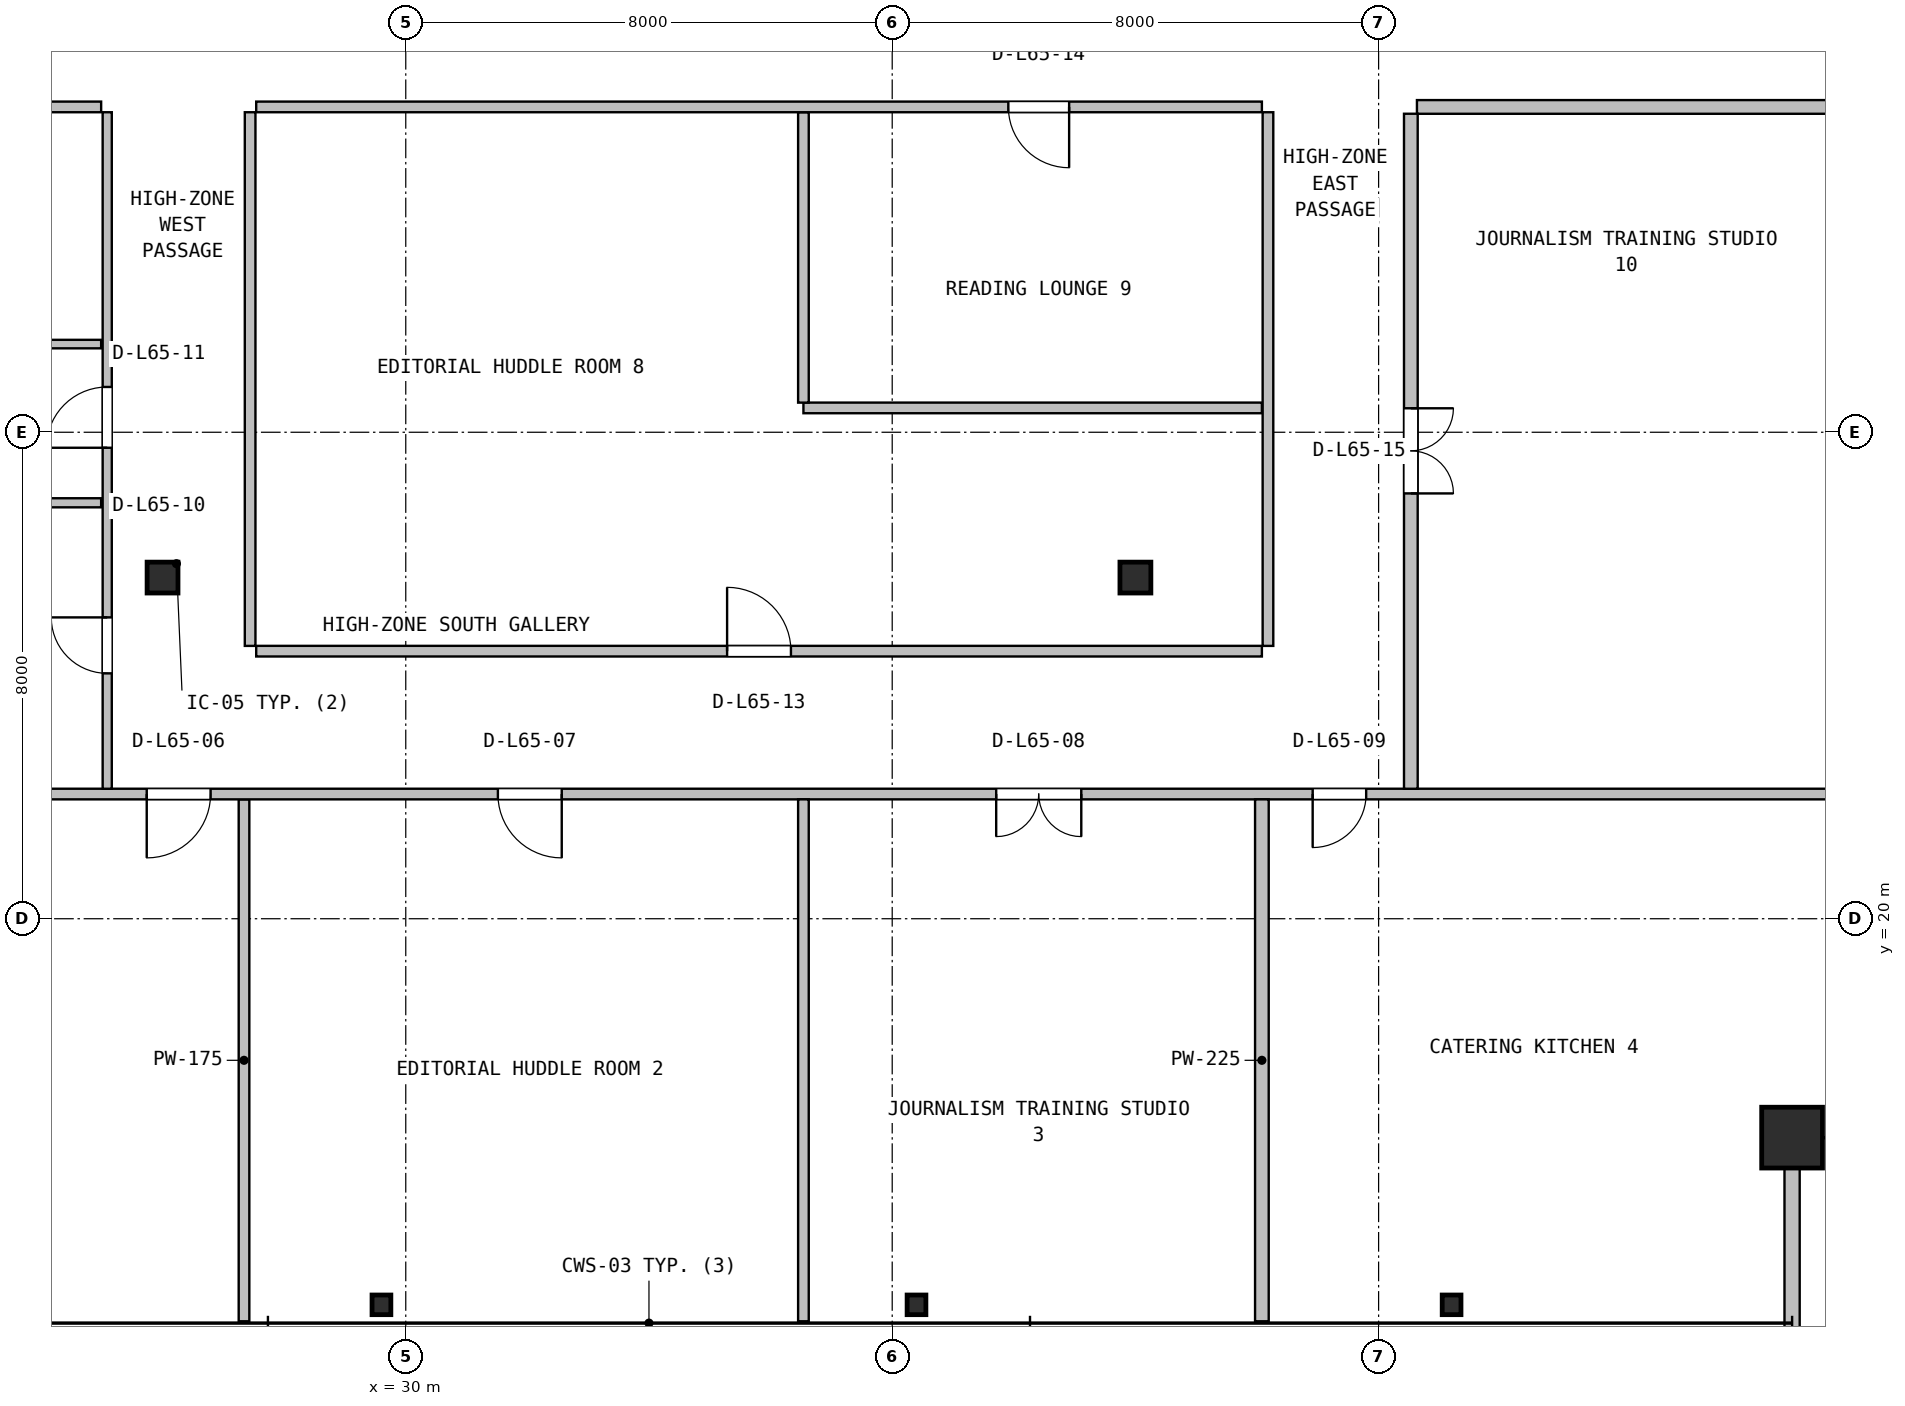
"""IFC4 building model, lengths in metres.
Left out: names, types, materials, properties, quantities, classifications, styles, units other than length and angle.
Written with IfcOpenShell. Run it as: python <this file> out.ifc"""

import sys

from ifc_helpers import new_model, si_unit, direction, frame, frame_2d, origin, origin_2d, place, context, subcontext, project, spatial, rectangle, hollow_rectangle, hollow_circle, i_section, extrude, source, transform, mapped, element, fill, save


model = new_model("IFC4")
c1 = context("Model", 3, precision=1e-05, world=origin(), true_north=direction((0.0, 1.0)))
c2 = subcontext(c1, "Body", "Model", "MODEL_VIEW")
j1 = project(units=[si_unit("LENGTHUNIT", "METRE"), si_unit("PLANEANGLEUNIT", "RADIAN")], contexts=[c1])
p1 = place(None, origin())
s1 = spatial("IfcSite", under=j1, at=p1, CompositionType="ELEMENT")
p2 = place(p1, origin())
s2 = spatial("IfcBuilding", under=s1, at=p2, CompositionType="ELEMENT")
p3 = place(p2, frame((0.0, 0.0, 262.2)))
s3 = spatial("IfcBuildingStorey", under=s2, at=p3, CompositionType="ELEMENT", Elevation=262.2)
m1 = source(origin(), c2, "Body", "SweptSolid", [
    extrude(hollow_rectangle(XDim=1.0, YDim=1.0, WallThickness=0.04, at=origin_2d()), origin(), (0.0, 0.0, 1.0), 3.8),
])
p4 = place(p3, frame((52.8, 16.4, 0.0), z_axis=(0.0, 0.0, 1.0), x_axis=(1.0, 0.0, 0.0)))
e1 = element("IfcColumn", 1, at=p4, inside=s3, PredefinedType="COLUMN", context=c2, shape_type="MappedRepresentation", body=[
    mapped(m1, transform((0.0, 0.0, 0.0), x_axis=(1.0, 0.0, 0.0), y_axis=(0.0, 1.0, 0.0), z_axis=(0.0, 0.0, 1.0), scale=1.0)),
])
m2 = source(origin(), c2, "Body", "SweptSolid", [
    extrude(i_section(OverallWidth=0.309, OverallDepth=0.323, WebThickness=0.014, FlangeThickness=0.023, FilletRadius=0.015, at=origin_2d()), origin(), (0.0, 0.0, 1.0), 3.8),
])
for number, where, z_axis, x_axis in (
    (2, (29.6, 13.65, 0.0), (0.0, 0.0, 1.0), (1.0, 0.0, 0.0)),
    (3, (38.4, 13.65, 0.0), (0.0, 0.0, 1.0), (1.0, 0.0, 0.0)),
    (4, (47.2, 13.65, 0.0), (0.0, 0.0, 1.0), (1.0, 0.0, 0.0)),
):
    element("IfcColumn", number, at=place(p3, frame(where, z_axis=z_axis, x_axis=x_axis)), inside=s3, PredefinedType="COLUMN", context=c2, shape_type="MappedRepresentation", body=[
        mapped(m2, transform((0.0, 0.0, 0.0), x_axis=(1.0, 0.0, 0.0), y_axis=(0.0, 1.0, 0.0), z_axis=(0.0, 0.0, 1.0), scale=1.0)),
    ])
m3 = source(origin(), c2, "Body", "SweptSolid", [
    extrude(hollow_circle(Radius=0.254, WallThickness=0.02, at=origin_2d()), origin(), (0.0, 0.0, 1.0), 3.8),
])
for number, where, z_axis, x_axis in (
    (5, (26.0, 25.61, 0.0), (0.0, 0.0, 1.0), (1.0, 0.0, 0.0)),
    (6, (42.0, 25.61, 0.0), (0.0, 0.0, 1.0), (1.0, 0.0, 0.0)),
):
    element("IfcColumn", number, at=place(p3, frame(where, z_axis=z_axis, x_axis=x_axis)), inside=s3, PredefinedType="COLUMN", context=c2, shape_type="MappedRepresentation", body=[
        mapped(m3, transform((0.0, 0.0, 0.0), x_axis=(1.0, 0.0, 0.0), y_axis=(0.0, 1.0, 0.0), z_axis=(0.0, 0.0, 1.0), scale=1.0)),
    ])
p5 = place(p3, frame((52.8, 13.28, 0.0), z_axis=(0.0, 0.0, 1.0), x_axis=(0.0, 1.0, 0.0)))
e7 = element("IfcWall", 7, at=p5, inside=s3, PredefinedType="SOLIDWALL", context=c2, shape_type="SweptSolid", body=[
    extrude(rectangle(XDim=3.2, YDim=0.25, at=frame_2d((1.6, 0.0))), origin(), (0.0, 0.0, 1.0), 3.171),
])
p6 = place(p3, frame((27.34, 13.38, 0.0), z_axis=(0.0, 0.0, 1.0), x_axis=(0.0, 1.0, 0.0)))
e8 = element("IfcWall", 8, at=p6, inside=s3, PredefinedType="PARTITIONING", context=c2, shape_type="SweptSolid", body=[
    extrude(rectangle(XDim=8.583, YDim=0.175, at=frame_2d((4.292, 0.0))), origin(), (0.0, 0.0, 1.0), 2.981),
])
p7 = place(p3, frame((12.18, 22.05, 0.0), z_axis=(0.0, 0.0, 1.0), x_axis=(1.0, 0.0, 0.0)))
e9 = element("IfcWall", 9, at=p7, inside=s3, PredefinedType="PARTITIONING", context=c2, shape_type="SweptSolid", body=[
    extrude(rectangle(XDim=43.64, YDim=0.175, at=frame_2d((21.82, 0.0))), origin(), (0.0, 0.0, 1.0), 2.981),
])
p8 = place(p7, frame((13.56, 0.0, 0.0)))
e10 = element("IfcOpeningElement", 10, at=p8, cuts=e9, PredefinedType="OPENING", context=c2, shape_type="SweptSolid", body=[
    extrude(rectangle(XDim=1.05, YDim=2.1, at=frame_2d((0.525, 1.05))), frame((0.0, 0.098, 0.0), z_axis=(0.0, -1.0, 0.0), x_axis=(1.0, 0.0, 0.0)), (0.0, 0.0, 1.0), 0.195),
])
p9 = place(p7, frame((19.335, 0.0, 0.0)))
e11 = element("IfcOpeningElement", 11, at=p9, cuts=e9, PredefinedType="OPENING", context=c2, shape_type="SweptSolid", body=[
    extrude(rectangle(XDim=1.05, YDim=2.1, at=frame_2d((0.525, 1.05))), frame((0.0, 0.098, 0.0), z_axis=(0.0, -1.0, 0.0), x_axis=(1.0, 0.0, 0.0)), (0.0, 0.0, 1.0), 0.195),
])
p10 = place(p7, frame((27.53, 0.0, 0.0)))
e12 = element("IfcOpeningElement", 12, at=p10, cuts=e9, PredefinedType="OPENING", context=c2, shape_type="SweptSolid", body=[
    extrude(rectangle(XDim=1.4, YDim=2.12, at=frame_2d((0.7, 1.06))), frame((0.0, 0.098, 0.0), z_axis=(0.0, -1.0, 0.0), x_axis=(1.0, 0.0, 0.0)), (0.0, 0.0, 1.0), 0.195),
])
p11 = place(p7, frame((32.735, 0.0, 0.0)))
e13 = element("IfcOpeningElement", 13, at=p11, cuts=e9, PredefinedType="OPENING", context=c2, shape_type="SweptSolid", body=[
    extrude(rectangle(XDim=0.88, YDim=2.06, at=frame_2d((0.44, 1.03))), frame((0.0, 0.098, 0.0), z_axis=(0.0, -1.0, 0.0), x_axis=(1.0, 0.0, 0.0)), (0.0, 0.0, 1.0), 0.195),
])
p12 = place(p3, frame((36.54, 13.38, 0.0), z_axis=(0.0, 0.0, 1.0), x_axis=(0.0, 1.0, 0.0)))
e14 = element("IfcWall", 14, at=p12, inside=s3, PredefinedType="PARTITIONING", context=c2, shape_type="SweptSolid", body=[
    extrude(rectangle(XDim=8.583, YDim=0.175, at=frame_2d((4.292, 0.0))), origin(), (0.0, 0.0, 1.0), 3.171),
])
p13 = place(p3, frame((44.08, 13.38, 0.0), z_axis=(0.0, 0.0, 1.0), x_axis=(0.0, 1.0, 0.0)))
e15 = element("IfcWall", 15, at=p13, inside=s3, PredefinedType="PARTITIONING", context=c2, shape_type="SweptSolid", body=[
    extrude(rectangle(XDim=8.583, YDim=0.225, at=frame_2d((4.292, 0.0))), origin(), (0.0, 0.0, 1.0), 3.171),
])
p14 = place(p3, frame((25.09, 22.137, 0.0), z_axis=(0.0, 0.0, 1.0), x_axis=(0.0, 1.0, 0.0)))
e16 = element("IfcWall", 16, at=p14, inside=s3, PredefinedType="PARTITIONING", context=c2, shape_type="SweptSolid", body=[
    extrude(rectangle(XDim=11.126, YDim=0.15, at=frame_2d((5.563, 0.0))), origin(), (0.0, 0.0, 1.0), 2.981),
])
p15 = place(p14, frame((1.898, 0.0, 0.0)))
e17 = element("IfcOpeningElement", 17, at=p15, cuts=e16, PredefinedType="OPENING", context=c2, shape_type="SweptSolid", body=[
    extrude(rectangle(XDim=0.92, YDim=2.08, at=frame_2d((0.46, 1.04))), frame((0.0, 0.085, 0.0), z_axis=(0.0, -1.0, 0.0), x_axis=(1.0, 0.0, 0.0)), (0.0, 0.0, 1.0), 0.17),
])
p16 = place(p14, frame((5.608, 0.0, 0.0)))
e18 = element("IfcOpeningElement", 18, at=p16, cuts=e16, PredefinedType="OPENING", context=c2, shape_type="SweptSolid", body=[
    extrude(rectangle(XDim=1.0, YDim=2.1, at=frame_2d((0.5, 1.05))), frame((0.0, 0.085, 0.0), z_axis=(0.0, -1.0, 0.0), x_axis=(1.0, 0.0, 0.0)), (0.0, 0.0, 1.0), 0.17),
])
p17 = place(p3, frame((12.18, 26.84, 0.0), z_axis=(0.0, 0.0, 1.0), x_axis=(1.0, 0.0, 0.0)))
e19 = element("IfcWall", 19, at=p17, inside=s3, PredefinedType="PARTITIONING", context=c2, shape_type="SweptSolid", body=[
    extrude(rectangle(XDim=12.81, YDim=0.15, at=frame_2d((6.405, 0.0))), origin(), (0.0, 0.0, 1.0), 3.171),
])
p18 = place(p3, frame((12.18, 29.45, 0.0), z_axis=(0.0, 0.0, 1.0), x_axis=(1.0, 0.0, 0.0)))
e20 = element("IfcWall", 20, at=p18, inside=s3, PredefinedType="PARTITIONING", context=c2, shape_type="SweptSolid", body=[
    extrude(rectangle(XDim=12.81, YDim=0.14, at=frame_2d((6.405, 0.0))), origin(), (0.0, 0.0, 1.0), 3.171),
])
p19 = place(p3, frame((12.18, 33.35, 0.0), z_axis=(0.0, 0.0, 1.0), x_axis=(1.0, 0.0, 0.0)))
e21 = element("IfcWall", 21, at=p19, inside=s3, PredefinedType="PARTITIONING", context=c2, shape_type="SweptSolid", body=[
    extrude(rectangle(XDim=12.81, YDim=0.175, at=frame_2d((6.405, 0.0))), origin(), (0.0, 0.0, 1.0), 2.981),
])
p20 = place(p19, frame((7.615, 0.0, 0.0)))
e22 = element("IfcOpeningElement", 22, at=p20, cuts=e21, PredefinedType="OPENING", context=c2, shape_type="SweptSolid", body=[
    extrude(rectangle(XDim=1.05, YDim=2.1, at=frame_2d((0.525, 1.05))), frame((0.0, 0.098, 0.0), z_axis=(0.0, -1.0, 0.0), x_axis=(1.0, 0.0, 0.0)), (0.0, 0.0, 1.0), 0.195),
])
p21 = place(p3, frame((27.54, 24.4, 0.0), z_axis=(0.0, 0.0, 1.0), x_axis=(1.0, 0.0, 0.0)))
e23 = element("IfcWall", 23, at=p21, inside=s3, PredefinedType="PARTITIONING", context=c2, shape_type="SweptSolid", body=[
    extrude(rectangle(XDim=16.54, YDim=0.175, at=frame_2d((8.27, 0.0))), origin(), (0.0, 0.0, 1.0), 2.981),
])
p22 = place(p21, frame((7.745, 0.0, 0.0)))
e24 = element("IfcOpeningElement", 24, at=p22, cuts=e23, PredefinedType="OPENING", context=c2, shape_type="SweptSolid", body=[
    extrude(rectangle(XDim=1.05, YDim=2.1, at=frame_2d((0.525, 1.05))), frame((0.0, 0.098, 0.0), z_axis=(0.0, -1.0, 0.0), x_axis=(1.0, 0.0, 0.0)), (0.0, 0.0, 1.0), 0.195),
])
p23 = place(p3, frame((44.18, 24.487, 0.0), z_axis=(0.0, 0.0, 1.0), x_axis=(0.0, 1.0, 0.0)))
e25 = element("IfcWall", 25, at=p23, inside=s3, PredefinedType="PARTITIONING", context=c2, shape_type="SweptSolid", body=[
    extrude(rectangle(XDim=8.776, YDim=0.175, at=frame_2d((4.388, 0.0))), origin(), (0.0, 0.0, 1.0), 3.278),
])
p24 = place(p3, frame((36.54, 28.4, 0.0), z_axis=(0.0, 0.0, 1.0), x_axis=(1.0, 0.0, 0.0)))
e26 = element("IfcWall", 26, at=p24, inside=s3, PredefinedType="PARTITIONING", context=c2, shape_type="SweptSolid", body=[
    extrude(rectangle(XDim=7.54, YDim=0.175, at=frame_2d((3.77, 0.0))), origin(), (0.0, 0.0, 1.0), 2.981),
])
p25 = place(p3, frame((36.54, 28.487, 0.0), z_axis=(0.0, 0.0, 1.0), x_axis=(0.0, 1.0, 0.0)))
e27 = element("IfcWall", 27, at=p25, inside=s3, PredefinedType="PARTITIONING", context=c2, shape_type="SweptSolid", body=[
    extrude(rectangle(XDim=4.776, YDim=0.175, at=frame_2d((2.388, 0.0))), origin(), (0.0, 0.0, 1.0), 3.53),
])
p26 = place(p3, frame((27.54, 33.35, 0.0), z_axis=(0.0, 0.0, 1.0), x_axis=(1.0, 0.0, 0.0)))
e28 = element("IfcWall", 28, at=p26, inside=s3, PredefinedType="PARTITIONING", context=c2, shape_type="SweptSolid", body=[
    extrude(rectangle(XDim=16.54, YDim=0.175, at=frame_2d((8.27, 0.0))), origin(), (0.0, 0.0, 1.0), 2.981),
])
p27 = place(p26, frame((12.37, 0.0, 0.0)))
e29 = element("IfcOpeningElement", 29, at=p27, cuts=e28, PredefinedType="OPENING", context=c2, shape_type="SweptSolid", body=[
    extrude(rectangle(XDim=1.0, YDim=2.1, at=frame_2d((0.5, 1.05))), frame((0.0, 0.098, 0.0), z_axis=(0.0, -1.0, 0.0), x_axis=(1.0, 0.0, 0.0)), (0.0, 0.0, 1.0), 0.195),
])
p28 = place(p3, frame((27.44, 24.487, 0.0), z_axis=(0.0, 0.0, 1.0), x_axis=(0.0, 1.0, 0.0)))
e30 = element("IfcWall", 30, at=p28, inside=s3, PredefinedType="PARTITIONING", context=c2, shape_type="SweptSolid", body=[
    extrude(rectangle(XDim=8.776, YDim=0.175, at=frame_2d((4.388, 0.0))), origin(), (0.0, 0.0, 1.0), 2.981),
])
p29 = place(p3, frame((46.63, 33.35, 0.0), z_axis=(0.0, 0.0, 1.0), x_axis=(1.0, 0.0, 0.0)))
e31 = element("IfcWall", 31, at=p29, inside=s3, PredefinedType="PARTITIONING", context=c2, shape_type="SweptSolid", body=[
    extrude(rectangle(XDim=9.19, YDim=0.225, at=frame_2d((4.595, 0.0))), origin(), (0.0, 0.0, 1.0), 3.171),
])
p30 = place(p3, frame((46.53, 22.137, 0.0), z_axis=(0.0, 0.0, 1.0), x_axis=(0.0, 1.0, 0.0)))
e32 = element("IfcWall", 32, at=p30, inside=s3, PredefinedType="PARTITIONING", context=c2, shape_type="SweptSolid", body=[
    extrude(rectangle(XDim=11.101, YDim=0.225, at=frame_2d((5.551, 0.0))), origin(), (0.0, 0.0, 1.0), 3.222),
])
p31 = place(p30, frame((4.857, 0.0, 0.0)))
e33 = element("IfcOpeningElement", 33, at=p31, cuts=e32, PredefinedType="OPENING", context=c2, shape_type="SweptSolid", body=[
    extrude(rectangle(XDim=1.4, YDim=2.12, at=frame_2d((0.7, 1.06))), frame((0.0, 0.123, 0.0), z_axis=(0.0, -1.0, 0.0), x_axis=(1.0, 0.0, 0.0)), (0.0, 0.0, 1.0), 0.245),
])
m4 = source(origin(), c2, "Body", "SweptSolid", [
    extrude(rectangle(XDim=1.05, YDim=2.1, at=frame_2d((0.525, 1.05))), frame((0.0, 0.025, 0.0), z_axis=(0.0, -1.0, 0.0), x_axis=(1.0, 0.0, 0.0)), (0.0, 0.0, 1.0), 0.05),
])
p32 = place(p8, frame((1.05, 0.0, 0.0), z_axis=(0.0, 0.0, 1.0), x_axis=(-1.0, 0.0, 0.0)))
e34 = element("IfcDoor", 34, at=p32, inside=s3, OperationType="SINGLE_SWING_LEFT", PredefinedType="DOOR", context=c2, shape_type="MappedRepresentation", body=[
    mapped(m4, transform((0.0, 0.0, 0.0), x_axis=(1.0, 0.0, 0.0), y_axis=(0.0, 1.0, 0.0), z_axis=(0.0, 0.0, 1.0), scale=1.0)),
])
fill(e10, e34)
p33 = place(p9, frame((1.05, 0.0, 0.0), z_axis=(0.0, 0.0, 1.0), x_axis=(-1.0, 0.0, 0.0)))
e35 = element("IfcDoor", 35, at=p33, inside=s3, OperationType="SINGLE_SWING_RIGHT", PredefinedType="DOOR", context=c2, shape_type="MappedRepresentation", body=[
    mapped(m4, transform((0.0, 0.0, 0.0), x_axis=(1.0, 0.0, 0.0), y_axis=(0.0, 1.0, 0.0), z_axis=(0.0, 0.0, 1.0), scale=1.0)),
])
fill(e11, e35)
m5 = source(origin(), c2, "Body", "SweptSolid", [
    extrude(rectangle(XDim=1.4, YDim=2.12, at=frame_2d((0.7, 1.06))), frame((0.0, 0.025, 0.0), z_axis=(0.0, -1.0, 0.0), x_axis=(1.0, 0.0, 0.0)), (0.0, 0.0, 1.0), 0.05),
])
p34 = place(p10, frame((1.4, 0.0, 0.0), z_axis=(0.0, 0.0, 1.0), x_axis=(-1.0, 0.0, 0.0)))
e36 = element("IfcDoor", 36, at=p34, inside=s3, OperationType="DOUBLE_DOOR_SINGLE_SWING", PredefinedType="DOOR", context=c2, shape_type="MappedRepresentation", body=[
    mapped(m5, transform((0.0, 0.0, 0.0), x_axis=(1.0, 0.0, 0.0), y_axis=(0.0, 1.0, 0.0), z_axis=(0.0, 0.0, 1.0), scale=1.0)),
])
fill(e12, e36)
m6 = source(origin(), c2, "Body", "SweptSolid", [
    extrude(rectangle(XDim=0.88, YDim=2.06, at=frame_2d((0.44, 1.03))), frame((0.0, 0.025, 0.0), z_axis=(0.0, -1.0, 0.0), x_axis=(1.0, 0.0, 0.0)), (0.0, 0.0, 1.0), 0.05),
])
p35 = place(p11, frame((0.88, 0.0, 0.0), z_axis=(0.0, 0.0, 1.0), x_axis=(-1.0, 0.0, 0.0)))
e37 = element("IfcDoor", 37, at=p35, inside=s3, OperationType="SINGLE_SWING_LEFT", PredefinedType="DOOR", context=c2, shape_type="MappedRepresentation", body=[
    mapped(m6, transform((0.0, 0.0, 0.0), x_axis=(1.0, 0.0, 0.0), y_axis=(0.0, 1.0, 0.0), z_axis=(0.0, 0.0, 1.0), scale=1.0)),
])
fill(e13, e37)
m7 = source(origin(), c2, "Body", "SweptSolid", [
    extrude(rectangle(XDim=0.92, YDim=2.08, at=frame_2d((0.46, 1.04))), frame((0.0, 0.025, 0.0), z_axis=(0.0, -1.0, 0.0), x_axis=(1.0, 0.0, 0.0)), (0.0, 0.0, 1.0), 0.05),
])
p36 = place(p15, origin())
e38 = element("IfcDoor", 38, at=p36, inside=s3, OperationType="SINGLE_SWING_RIGHT", PredefinedType="DOOR", context=c2, shape_type="MappedRepresentation", body=[
    mapped(m7, transform((0.0, 0.0, 0.0), x_axis=(1.0, 0.0, 0.0), y_axis=(0.0, 1.0, 0.0), z_axis=(0.0, 0.0, 1.0), scale=1.0)),
])
fill(e17, e38)
m8 = source(origin(), c2, "Body", "SweptSolid", [
    extrude(rectangle(XDim=1.0, YDim=2.1, at=frame_2d((0.5, 1.05))), frame((0.0, 0.025, 0.0), z_axis=(0.0, -1.0, 0.0), x_axis=(1.0, 0.0, 0.0)), (0.0, 0.0, 1.0), 0.05),
])
p37 = place(p16, origin())
e39 = element("IfcDoor", 39, at=p37, inside=s3, OperationType="SINGLE_SWING_LEFT", PredefinedType="DOOR", context=c2, shape_type="MappedRepresentation", body=[
    mapped(m8, transform((0.0, 0.0, 0.0), x_axis=(1.0, 0.0, 0.0), y_axis=(0.0, 1.0, 0.0), z_axis=(0.0, 0.0, 1.0), scale=1.0)),
])
fill(e18, e39)
p38 = place(p22, origin())
e40 = element("IfcDoor", 40, at=p38, inside=s3, OperationType="SINGLE_SWING_LEFT", PredefinedType="DOOR", context=c2, shape_type="MappedRepresentation", body=[
    mapped(m4, transform((0.0, 0.0, 0.0), x_axis=(1.0, 0.0, 0.0), y_axis=(0.0, 1.0, 0.0), z_axis=(0.0, 0.0, 1.0), scale=1.0)),
])
fill(e24, e40)
p39 = place(p27, frame((1.0, 0.0, 0.0), z_axis=(0.0, 0.0, 1.0), x_axis=(-1.0, 0.0, 0.0)))
e41 = element("IfcDoor", 41, at=p39, inside=s3, OperationType="SINGLE_SWING_RIGHT", PredefinedType="DOOR", context=c2, shape_type="MappedRepresentation", body=[
    mapped(m8, transform((0.0, 0.0, 0.0), x_axis=(1.0, 0.0, 0.0), y_axis=(0.0, 1.0, 0.0), z_axis=(0.0, 0.0, 1.0), scale=1.0)),
])
fill(e29, e41)
p40 = place(p31, frame((1.4, 0.0, 0.0), z_axis=(0.0, 0.0, 1.0), x_axis=(-1.0, 0.0, 0.0)))
e42 = element("IfcDoor", 42, at=p40, inside=s3, OperationType="DOUBLE_DOOR_SINGLE_SWING", PredefinedType="DOOR", context=c2, shape_type="MappedRepresentation", body=[
    mapped(m5, transform((0.0, 0.0, 0.0), x_axis=(1.0, 0.0, 0.0), y_axis=(0.0, 1.0, 0.0), z_axis=(0.0, 0.0, 1.0), scale=1.0)),
])
fill(e33, e42)
save(model, sys.argv[1])
